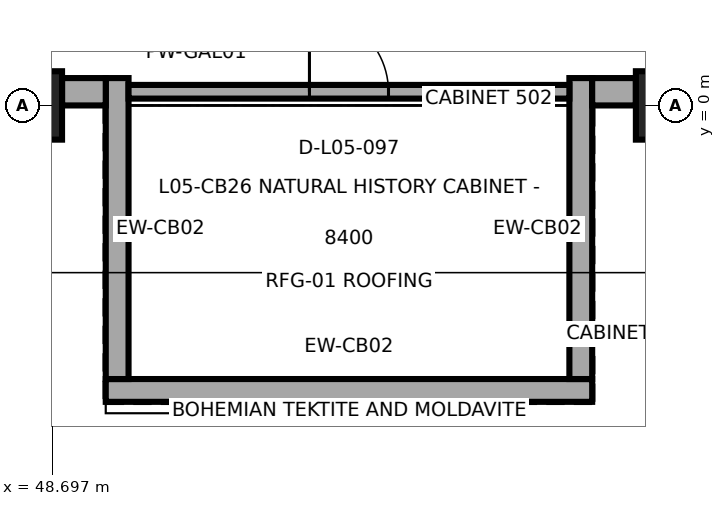
"""IFC4 building model, lengths in metres.
Left out: names, types, materials, properties, quantities, classifications, styles, units other than length and angle.
Written with IfcOpenShell. Run it as: python <this file> out.ifc"""

import sys

from ifc_helpers import new_model, si_unit, direction, frame, frame_2d, origin, origin_2d, place, context, subcontext, project, spatial, rectangle, extrude, element, fill, save


model = new_model("IFC4")
c1 = context("Model", 3, precision=1e-05, world=origin(), true_north=direction((0.0, 1.0)))
c2 = subcontext(c1, "Body", "Model", "MODEL_VIEW")
j1 = project(units=[si_unit("LENGTHUNIT", "METRE"), si_unit("PLANEANGLEUNIT", "RADIAN")], contexts=[c1])
p1 = place(None, origin())
s1 = spatial("IfcSite", under=j1, at=p1, CompositionType="ELEMENT")
p2 = place(p1, origin())
s2 = spatial("IfcBuilding", under=s1, at=p2, CompositionType="ELEMENT")
p3 = place(p2, frame((0.0, 0.0, 26.4)))
s3 = spatial("IfcBuildingStorey", under=s2, at=p3, CompositionType="ELEMENT", Elevation=26.4)
for number, where, z_axis, x_axis in (
    (1, (48.4, 0.0, 0.0), (0.0, 0.0, 1.0), (1.0, 0.0, 0.0)),
    (2, (56.8, 0.0, 0.0), (0.0, 0.0, 1.0), (1.0, 0.0, 0.0)),
):
    element("IfcColumn", number, at=place(p3, frame(where, z_axis=z_axis, x_axis=x_axis)), inside=s3, PredefinedType="COLUMN", context=c2, shape_type="SweptSolid", body=[
        extrude(rectangle(XDim=0.85, YDim=0.9, at=origin_2d()), origin(), (0.0, 0.0, 1.0), 4.8),
    ])
p4 = place(p3, frame((49.4, -3.75, 0.0), z_axis=(0.0, 0.0, 1.0), x_axis=(1.0, 0.0, 0.0)))
e3 = element("IfcWall", 3, at=p4, inside=s3, PredefinedType="SOLIDWALL", context=c2, shape_type="SweptSolid", body=[
    extrude(rectangle(XDim=6.4, YDim=0.3, at=frame_2d((3.2, 0.0))), origin(), (0.0, 0.0, 1.0), 2.99),
])
for number, where, z_axis, x_axis in (
    (4, (49.55, 0.36, 0.0), (0.0, 0.0, 1.0), (0.0, -1.0, 0.0)),
    (5, (55.65, -3.6, 0.0), (0.0, 0.0, 1.0), (0.0, 1.0, 0.0)),
):
    element("IfcWall", number, at=place(p3, frame(where, z_axis=z_axis, x_axis=x_axis)), inside=s3, PredefinedType="SOLIDWALL", context=c2, shape_type="SweptSolid", body=[
        extrude(rectangle(XDim=3.96, YDim=0.3, at=frame_2d((1.98, 0.0))), origin(), (0.0, 0.0, 1.0), 2.99),
    ])
for number, where, z_axis, x_axis in (
    (6, (48.825, 0.18, 0.0), (0.0, 0.0, 1.0), (1.0, 0.0, 0.0)),
    (7, (55.8, 0.18, 0.0), (0.0, 0.0, 1.0), (1.0, 0.0, 0.0)),
):
    element("IfcWall", number, at=place(p3, frame(where, z_axis=z_axis, x_axis=x_axis)), inside=s3, PredefinedType="SOLIDWALL", context=c2, shape_type="SweptSolid", body=[
        extrude(rectangle(XDim=0.575, YDim=0.36, at=frame_2d((0.288, 0.0))), origin(), (0.0, 0.0, 1.0), 3.625),
    ])
p5 = place(p3, frame((49.7, 0.18, 0.0), z_axis=(0.0, 0.0, 1.0), x_axis=(1.0, 0.0, 0.0)))
e8 = element("IfcWall", 8, at=p5, inside=s3, PredefinedType="PARTITIONING", context=c2, shape_type="SweptSolid", body=[
    extrude(rectangle(XDim=5.8, YDim=0.18, at=frame_2d((2.9, 0.0))), origin(), (0.0, 0.0, 1.0), 2.99),
])
p6 = place(p5, frame((2.38, 0.0, 0.0)))
e9 = element("IfcOpeningElement", 9, at=p6, cuts=e8, PredefinedType="OPENING", context=c2, shape_type="SweptSolid", body=[
    extrude(rectangle(XDim=1.04, YDim=2.18, at=frame_2d((0.52, 1.09))), frame((0.0, 0.1, 0.0), z_axis=(0.0, -1.0, 0.0), x_axis=(1.0, 0.0, 0.0)), (0.0, 0.0, 1.0), 0.2),
])
p7 = place(p6, origin())
e10 = element("IfcDoor", 10, at=p7, inside=s3, OperationType="SINGLE_SWING_LEFT", PredefinedType="DOOR", context=c2, shape_type="SweptSolid", body=[
    extrude(rectangle(XDim=1.04, YDim=2.18, at=frame_2d((0.52, 1.09))), frame((0.0, 0.025, 0.0), z_axis=(0.0, -1.0, 0.0), x_axis=(1.0, 0.0, 0.0)), (0.0, 0.0, 1.0), 0.05),
])
fill(e9, e10)
save(model, sys.argv[1])
